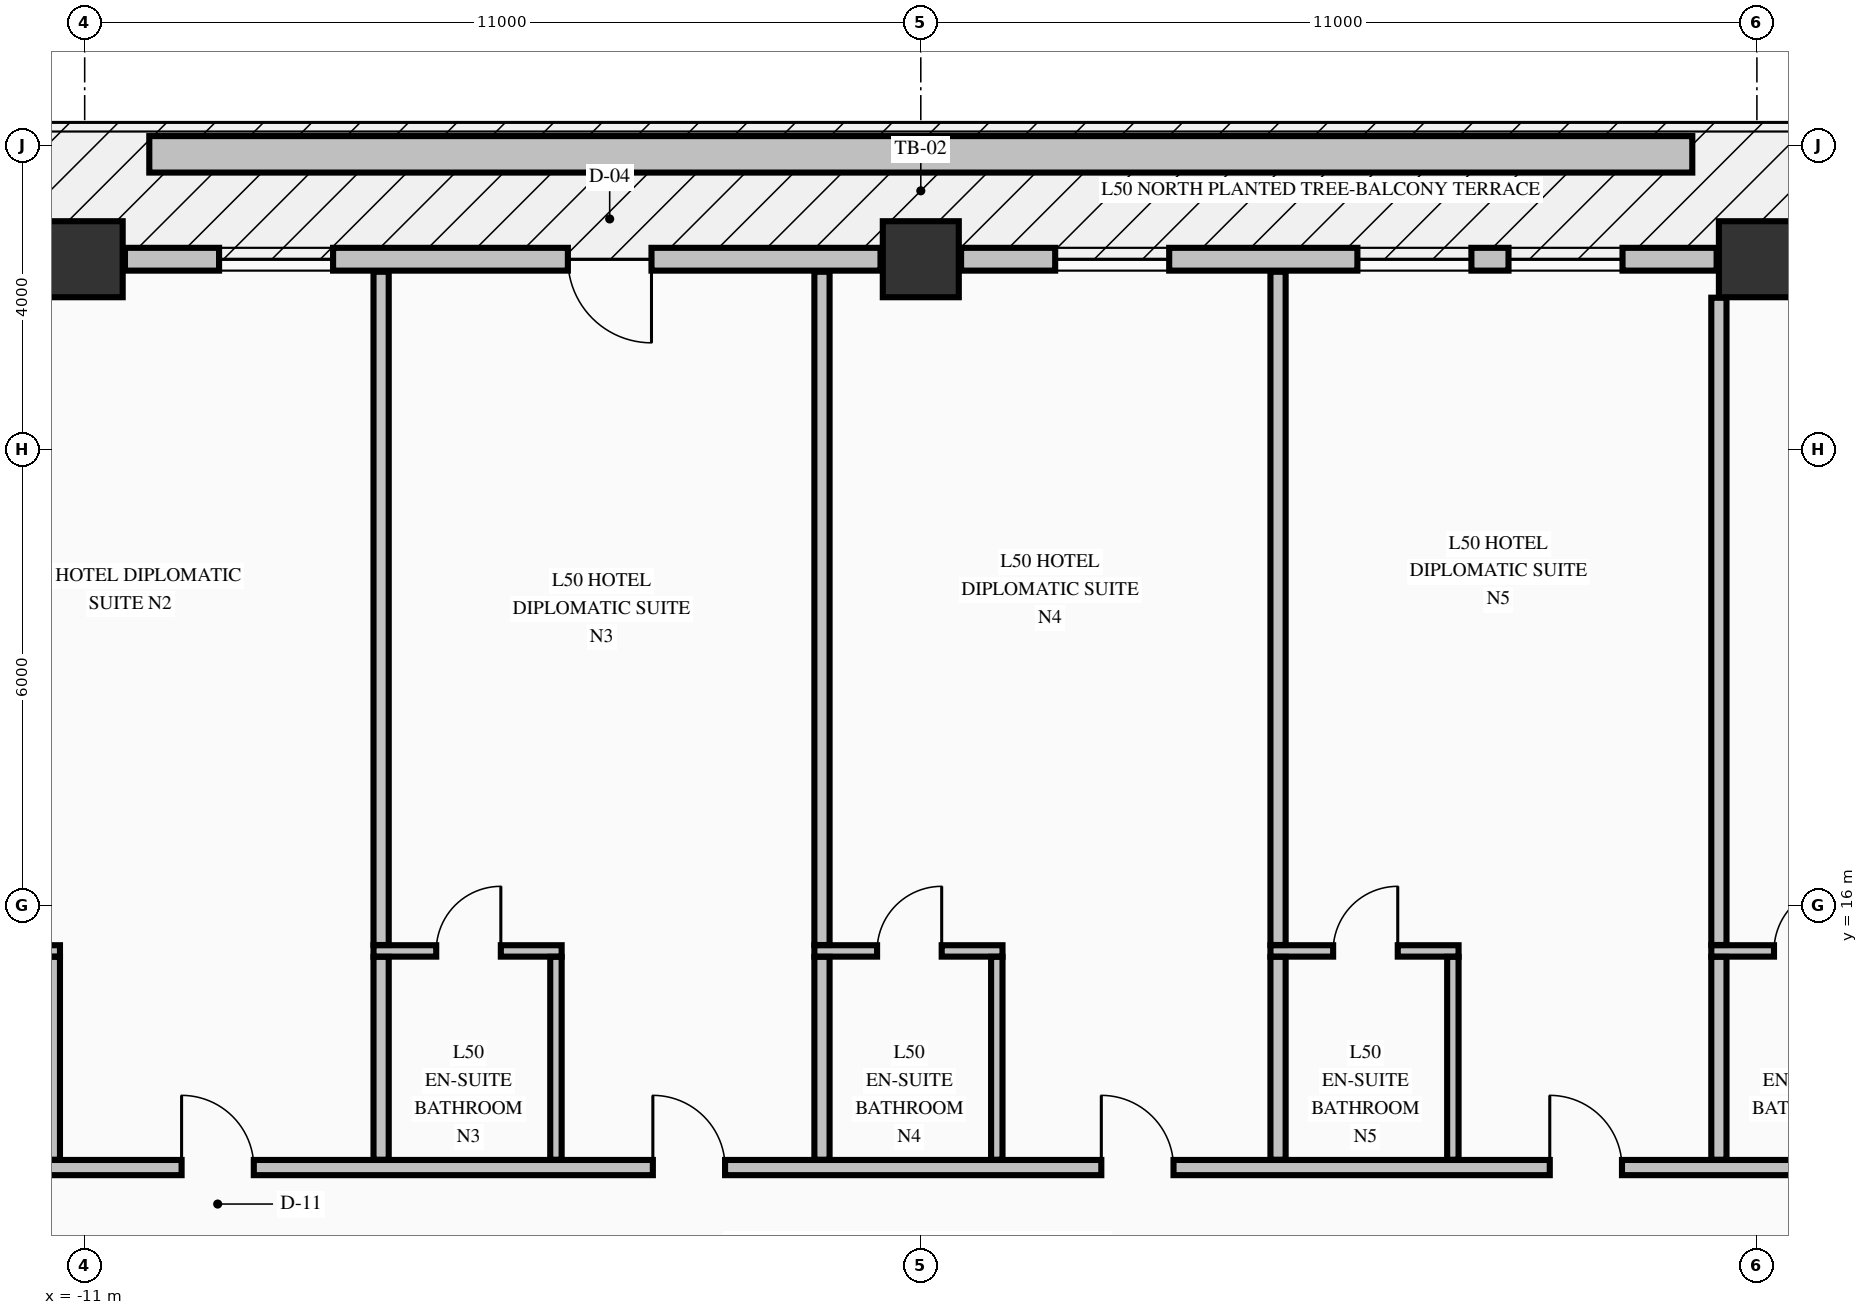
"""IFC4 building model, lengths in metres.
Left out: names, types, materials, properties, quantities, classifications, styles, units other than length and angle.
Written with IfcOpenShell. Run it as: python <this file> out.ifc"""

import sys

from ifc_helpers import new_model, si_unit, direction, frame, frame_2d, origin, origin_2d, place, context, subcontext, project, spatial, rectangle, extrude, element, fill, save


model = new_model("IFC4")
c1 = context("Model", 3, precision=1e-05, world=origin(), true_north=direction((0.0, 1.0)))
c2 = subcontext(c1, "Body", "Model", "MODEL_VIEW")
j1 = project(units=[si_unit("LENGTHUNIT", "METRE"), si_unit("PLANEANGLEUNIT", "RADIAN")], contexts=[c1])
p1 = place(None, origin())
s1 = spatial("IfcSite", under=j1, at=p1, CompositionType="ELEMENT")
p2 = place(p1, origin())
s2 = spatial("IfcBuilding", under=s1, at=p2, CompositionType="ELEMENT")
p3 = place(p2, frame((0.0, 0.0, 194.86)))
s3 = spatial("IfcBuildingStorey", under=s2, at=p3, CompositionType="ELEMENT", Elevation=194.86)
for number, where, z_axis, x_axis in (
    (1, (-11.0, 24.5, -0.275), (0.0, 0.0, 1.0), (1.0, 0.0, 0.0)),
    (2, (0.0, 24.5, -0.275), (0.0, 0.0, 1.0), (1.0, 0.0, 0.0)),
    (3, (11.0, 24.5, -0.275), (0.0, 0.0, 1.0), (1.0, 0.0, 0.0)),
):
    element("IfcColumn", number, at=place(p3, frame(where, z_axis=z_axis, x_axis=x_axis)), inside=s3, PredefinedType="COLUMN", context=c2, shape_type="SweptSolid", body=[
        extrude(rectangle(XDim=1.0, YDim=1.0, at=origin_2d()), origin(), (0.0, 0.0, 1.0), 3.425),
    ])
p4 = place(p3, frame((-0.53, 24.5, 0.0), z_axis=(0.0, 0.0, 1.0), x_axis=(-1.0, 0.0, 0.0)))
e4 = element("IfcWall", 4, at=p4, inside=s3, PredefinedType="STANDARD", context=c2, shape_type="SweptSolid", body=[
    extrude(rectangle(XDim=9.94, YDim=0.3, at=frame_2d((4.97, 0.0))), origin(), (0.0, 0.0, 1.0), 2.542),
])
p5 = place(p4, frame((3.013, 0.0, 0.0)))
e5 = element("IfcOpeningElement", 5, at=p5, cuts=e4, PredefinedType="OPENING", context=c2, shape_type="SweptSolid", body=[
    extrude(rectangle(XDim=1.1, YDim=2.15, at=frame_2d((0.55, 1.075))), frame((0.0, 0.16, 0.0), z_axis=(0.0, -1.0, 0.0), x_axis=(1.0, 0.0, 0.0)), (0.0, 0.0, 1.0), 0.32),
])
p6 = place(p4, frame((7.202, 0.0, 0.72)))
e6 = element("IfcOpeningElement", 6, at=p6, cuts=e4, PredefinedType="OPENING", context=c2, shape_type="SweptSolid", body=[
    extrude(rectangle(XDim=1.5, YDim=1.6, at=frame_2d((0.75, 0.8))), frame((0.0, 0.16, 0.0), z_axis=(0.0, -1.0, 0.0), x_axis=(1.0, 0.0, 0.0)), (0.0, 0.0, 1.0), 0.32),
])
p7 = place(p3, frame((10.47, 24.5, 0.0), z_axis=(0.0, 0.0, 1.0), x_axis=(-1.0, 0.0, 0.0)))
e7 = element("IfcWall", 7, at=p7, inside=s3, PredefinedType="STANDARD", context=c2, shape_type="SweptSolid", body=[
    extrude(rectangle(XDim=9.94, YDim=0.3, at=frame_2d((4.97, 0.0))), origin(), (0.0, 0.0, 1.0), 2.542),
])
p8 = place(p7, frame((1.238, 0.0, 0.72)))
e8 = element("IfcOpeningElement", 8, at=p8, cuts=e7, PredefinedType="OPENING", context=c2, shape_type="SweptSolid", body=[
    extrude(rectangle(XDim=1.5, YDim=1.6, at=frame_2d((0.75, 0.8))), frame((0.0, 0.16, 0.0), z_axis=(0.0, -1.0, 0.0), x_axis=(1.0, 0.0, 0.0)), (0.0, 0.0, 1.0), 0.32),
])
p9 = place(p7, frame((3.226, 0.0, 0.72)))
e9 = element("IfcOpeningElement", 9, at=p9, cuts=e7, PredefinedType="OPENING", context=c2, shape_type="SweptSolid", body=[
    extrude(rectangle(XDim=1.5, YDim=1.6, at=frame_2d((0.75, 0.8))), frame((0.0, 0.16, 0.0), z_axis=(0.0, -1.0, 0.0), x_axis=(1.0, 0.0, 0.0)), (0.0, 0.0, 1.0), 0.32),
])
p10 = place(p7, frame((7.202, 0.0, 0.72)))
e10 = element("IfcOpeningElement", 10, at=p10, cuts=e7, PredefinedType="OPENING", context=c2, shape_type="SweptSolid", body=[
    extrude(rectangle(XDim=1.5, YDim=1.6, at=frame_2d((0.75, 0.8))), frame((0.0, 0.16, 0.0), z_axis=(0.0, -1.0, 0.0), x_axis=(1.0, 0.0, 0.0)), (0.0, 0.0, 1.0), 0.32),
])
p11 = place(p3, frame((-22.1, 12.55, 0.0), z_axis=(0.0, 0.0, 1.0), x_axis=(1.0, 0.0, 0.0)))
e11 = element("IfcWall", 11, at=p11, inside=s3, PredefinedType="PARTITIONING", context=c2, shape_type="SweptSolid", body=[
    extrude(rectangle(XDim=39.2, YDim=0.2, at=frame_2d((19.6, 0.0))), origin(), (0.0, 0.0, 1.0), 3.15),
])
p12 = place(p11, frame((4.925, 0.0, 0.0)))
e12 = element("IfcOpeningElement", 12, at=p12, cuts=e11, PredefinedType="OPENING", context=c2, shape_type="SweptSolid", body=[
    extrude(rectangle(XDim=0.95, YDim=2.15, at=frame_2d((0.475, 1.075))), frame((0.0, 0.11, 0.0), z_axis=(0.0, -1.0, 0.0), x_axis=(1.0, 0.0, 0.0)), (0.0, 0.0, 1.0), 0.22),
])
p13 = place(p11, frame((12.375, 0.0, 0.0)))
e13 = element("IfcOpeningElement", 13, at=p13, cuts=e11, PredefinedType="OPENING", context=c2, shape_type="SweptSolid", body=[
    extrude(rectangle(XDim=0.95, YDim=2.15, at=frame_2d((0.475, 1.075))), frame((0.0, 0.11, 0.0), z_axis=(0.0, -1.0, 0.0), x_axis=(1.0, 0.0, 0.0)), (0.0, 0.0, 1.0), 0.22),
])
p14 = place(p11, frame((18.575, 0.0, 0.0)))
e14 = element("IfcOpeningElement", 14, at=p14, cuts=e11, PredefinedType="OPENING", context=c2, shape_type="SweptSolid", body=[
    extrude(rectangle(XDim=0.95, YDim=2.15, at=frame_2d((0.475, 1.075))), frame((0.0, 0.11, 0.0), z_axis=(0.0, -1.0, 0.0), x_axis=(1.0, 0.0, 0.0)), (0.0, 0.0, 1.0), 0.22),
])
p15 = place(p11, frame((24.475, 0.0, 0.0)))
e15 = element("IfcOpeningElement", 15, at=p15, cuts=e11, PredefinedType="OPENING", context=c2, shape_type="SweptSolid", body=[
    extrude(rectangle(XDim=0.95, YDim=2.15, at=frame_2d((0.475, 1.075))), frame((0.0, 0.11, 0.0), z_axis=(0.0, -1.0, 0.0), x_axis=(1.0, 0.0, 0.0)), (0.0, 0.0, 1.0), 0.22),
])
p16 = place(p11, frame((30.375, 0.0, 0.0)))
e16 = element("IfcOpeningElement", 16, at=p16, cuts=e11, PredefinedType="OPENING", context=c2, shape_type="SweptSolid", body=[
    extrude(rectangle(XDim=0.95, YDim=2.15, at=frame_2d((0.475, 1.075))), frame((0.0, 0.11, 0.0), z_axis=(0.0, -1.0, 0.0), x_axis=(1.0, 0.0, 0.0)), (0.0, 0.0, 1.0), 0.22),
])
p17 = place(p11, frame((36.525, 0.0, 0.0)))
e17 = element("IfcOpeningElement", 17, at=p17, cuts=e11, PredefinedType="OPENING", context=c2, shape_type="SweptSolid", body=[
    extrude(rectangle(XDim=0.95, YDim=2.15, at=frame_2d((0.475, 1.075))), frame((0.0, 0.11, 0.0), z_axis=(0.0, -1.0, 0.0), x_axis=(1.0, 0.0, 0.0)), (0.0, 0.0, 1.0), 0.22),
])
p18 = place(p3, frame((-13.8, 15.4, 0.0), z_axis=(0.0, 0.0, 1.0), x_axis=(1.0, 0.0, 0.0)))
e18 = element("IfcWall", 18, at=p18, inside=s3, PredefinedType="PARTITIONING", context=c2, shape_type="SweptSolid", body=[
    extrude(rectangle(XDim=2.475, YDim=0.15, at=frame_2d((1.238, 0.0))), origin(), (0.0, 0.0, 1.0), 3.15),
])
p19 = place(p18, frame((0.825, 0.0, 0.0)))
e19 = element("IfcOpeningElement", 19, at=p19, cuts=e18, PredefinedType="OPENING", context=c2, shape_type="SweptSolid", body=[
    extrude(rectangle(XDim=0.85, YDim=2.1, at=frame_2d((0.425, 1.05))), frame((0.0, 0.085, 0.0), z_axis=(0.0, -1.0, 0.0), x_axis=(1.0, 0.0, 0.0)), (0.0, 0.0, 1.0), 0.17),
])
p20 = place(p3, frame((-7.2, 15.4, 0.0), z_axis=(0.0, 0.0, 1.0), x_axis=(1.0, 0.0, 0.0)))
e20 = element("IfcWall", 20, at=p20, inside=s3, PredefinedType="PARTITIONING", context=c2, shape_type="SweptSolid", body=[
    extrude(rectangle(XDim=2.475, YDim=0.15, at=frame_2d((1.237, 0.0))), origin(), (0.0, 0.0, 1.0), 3.15),
])
p21 = place(p20, frame((0.825, 0.0, 0.0)))
e21 = element("IfcOpeningElement", 21, at=p21, cuts=e20, PredefinedType="OPENING", context=c2, shape_type="SweptSolid", body=[
    extrude(rectangle(XDim=0.85, YDim=2.1, at=frame_2d((0.425, 1.05))), frame((0.0, 0.085, 0.0), z_axis=(0.0, -1.0, 0.0), x_axis=(1.0, 0.0, 0.0)), (0.0, 0.0, 1.0), 0.17),
])
p22 = place(p3, frame((-1.4, 15.4, 0.0), z_axis=(0.0, 0.0, 1.0), x_axis=(1.0, 0.0, 0.0)))
e22 = element("IfcWall", 22, at=p22, inside=s3, PredefinedType="PARTITIONING", context=c2, shape_type="SweptSolid", body=[
    extrude(rectangle(XDim=2.475, YDim=0.15, at=frame_2d((1.237, 0.0))), origin(), (0.0, 0.0, 1.0), 3.15),
])
p23 = place(p22, frame((0.825, 0.0, 0.0)))
e23 = element("IfcOpeningElement", 23, at=p23, cuts=e22, PredefinedType="OPENING", context=c2, shape_type="SweptSolid", body=[
    extrude(rectangle(XDim=0.85, YDim=2.1, at=frame_2d((0.425, 1.05))), frame((0.0, 0.085, 0.0), z_axis=(0.0, -1.0, 0.0), x_axis=(1.0, 0.0, 0.0)), (0.0, 0.0, 1.0), 0.17),
])
p24 = place(p3, frame((4.6, 15.4, 0.0), z_axis=(0.0, 0.0, 1.0), x_axis=(1.0, 0.0, 0.0)))
e24 = element("IfcWall", 24, at=p24, inside=s3, PredefinedType="PARTITIONING", context=c2, shape_type="SweptSolid", body=[
    extrude(rectangle(XDim=2.475, YDim=0.15, at=frame_2d((1.237, 0.0))), origin(), (0.0, 0.0, 1.0), 3.15),
])
p25 = place(p24, frame((0.825, 0.0, 0.0)))
e25 = element("IfcOpeningElement", 25, at=p25, cuts=e24, PredefinedType="OPENING", context=c2, shape_type="SweptSolid", body=[
    extrude(rectangle(XDim=0.85, YDim=2.1, at=frame_2d((0.425, 1.05))), frame((0.0, 0.085, 0.0), z_axis=(0.0, -1.0, 0.0), x_axis=(1.0, 0.0, 0.0)), (0.0, 0.0, 1.0), 0.17),
])
p26 = place(p3, frame((10.4, 15.4, 0.0), z_axis=(0.0, 0.0, 1.0), x_axis=(1.0, 0.0, 0.0)))
e26 = element("IfcWall", 26, at=p26, inside=s3, PredefinedType="PARTITIONING", context=c2, shape_type="SweptSolid", body=[
    extrude(rectangle(XDim=2.475, YDim=0.15, at=frame_2d((1.238, 0.0))), origin(), (0.0, 0.0, 1.0), 3.15),
])
p27 = place(p26, frame((0.825, 0.0, 0.0)))
e27 = element("IfcOpeningElement", 27, at=p27, cuts=e26, PredefinedType="OPENING", context=c2, shape_type="SweptSolid", body=[
    extrude(rectangle(XDim=0.85, YDim=2.1, at=frame_2d((0.425, 1.05))), frame((0.0, 0.085, 0.0), z_axis=(0.0, -1.0, 0.0), x_axis=(1.0, 0.0, 0.0)), (0.0, 0.0, 1.0), 0.17),
])
p28 = place(p3, frame((-11.4, 12.653, 0.0), z_axis=(0.0, 0.0, 1.0), x_axis=(0.0, 1.0, 0.0)))
e28 = element("IfcWall", 28, at=p28, inside=s3, PredefinedType="PARTITIONING", context=c2, shape_type="SweptSolid", body=[
    extrude(rectangle(XDim=2.669, YDim=0.15, at=frame_2d((1.334, 0.0))), origin(), (0.0, 0.0, 1.0), 2.342),
])
p29 = place(p3, frame((-7.1, 12.653, 0.0), z_axis=(0.0, 0.0, 1.0), x_axis=(0.0, 1.0, 0.0)))
e29 = element("IfcWall", 29, at=p29, inside=s3, PredefinedType="PARTITIONING", context=c2, shape_type="SweptSolid", body=[
    extrude(rectangle(XDim=2.669, YDim=0.2, at=frame_2d((1.334, 0.0))), origin(), (0.0, 0.0, 1.0), 3.15),
])
p30 = place(p3, frame((-7.1, 15.478, 0.0), z_axis=(0.0, 0.0, 1.0), x_axis=(0.0, 1.0, 0.0)))
e30 = element("IfcWall", 30, at=p30, inside=s3, PredefinedType="PARTITIONING", context=c2, shape_type="SweptSolid", body=[
    extrude(rectangle(XDim=8.857, YDim=0.2, at=frame_2d((4.428, 0.0))), origin(), (0.0, 0.0, 1.0), 3.15),
])
p31 = place(p3, frame((-4.8, 12.653, 0.0), z_axis=(0.0, 0.0, 1.0), x_axis=(0.0, 1.0, 0.0)))
e31 = element("IfcWall", 31, at=p31, inside=s3, PredefinedType="PARTITIONING", context=c2, shape_type="SweptSolid", body=[
    extrude(rectangle(XDim=2.669, YDim=0.15, at=frame_2d((1.334, 0.0))), origin(), (0.0, 0.0, 1.0), 3.15),
])
p32 = place(p3, frame((-1.3, 12.653, 0.0), z_axis=(0.0, 0.0, 1.0), x_axis=(0.0, 1.0, 0.0)))
e32 = element("IfcWall", 32, at=p32, inside=s3, PredefinedType="PARTITIONING", context=c2, shape_type="SweptSolid", body=[
    extrude(rectangle(XDim=2.669, YDim=0.2, at=frame_2d((1.334, 0.0))), origin(), (0.0, 0.0, 1.0), 3.15),
])
p33 = place(p3, frame((-1.3, 15.478, 0.0), z_axis=(0.0, 0.0, 1.0), x_axis=(0.0, 1.0, 0.0)))
e33 = element("IfcWall", 33, at=p33, inside=s3, PredefinedType="PARTITIONING", context=c2, shape_type="SweptSolid", body=[
    extrude(rectangle(XDim=8.857, YDim=0.2, at=frame_2d((4.428, 0.0))), origin(), (0.0, 0.0, 1.0), 3.15),
])
p34 = place(p3, frame((1.0, 12.653, 0.0), z_axis=(0.0, 0.0, 1.0), x_axis=(0.0, 1.0, 0.0)))
e34 = element("IfcWall", 34, at=p34, inside=s3, PredefinedType="PARTITIONING", context=c2, shape_type="SweptSolid", body=[
    extrude(rectangle(XDim=2.669, YDim=0.15, at=frame_2d((1.334, 0.0))), origin(), (0.0, 0.0, 1.0), 3.15),
])
p35 = place(p3, frame((4.7, 12.653, 0.0), z_axis=(0.0, 0.0, 1.0), x_axis=(0.0, 1.0, 0.0)))
e35 = element("IfcWall", 35, at=p35, inside=s3, PredefinedType="PARTITIONING", context=c2, shape_type="SweptSolid", body=[
    extrude(rectangle(XDim=2.669, YDim=0.2, at=frame_2d((1.334, 0.0))), origin(), (0.0, 0.0, 1.0), 3.15),
])
p36 = place(p3, frame((4.7, 15.478, 0.0), z_axis=(0.0, 0.0, 1.0), x_axis=(0.0, 1.0, 0.0)))
e36 = element("IfcWall", 36, at=p36, inside=s3, PredefinedType="PARTITIONING", context=c2, shape_type="SweptSolid", body=[
    extrude(rectangle(XDim=8.857, YDim=0.2, at=frame_2d((4.428, 0.0))), origin(), (0.0, 0.0, 1.0), 3.15),
])
p37 = place(p3, frame((7.0, 12.653, 0.0), z_axis=(0.0, 0.0, 1.0), x_axis=(0.0, 1.0, 0.0)))
e37 = element("IfcWall", 37, at=p37, inside=s3, PredefinedType="PARTITIONING", context=c2, shape_type="SweptSolid", body=[
    extrude(rectangle(XDim=2.669, YDim=0.15, at=frame_2d((1.334, 0.0))), origin(), (0.0, 0.0, 1.0), 3.15),
])
p38 = place(p3, frame((10.5, 12.653, 0.0), z_axis=(0.0, 0.0, 1.0), x_axis=(0.0, 1.0, 0.0)))
e38 = element("IfcWall", 38, at=p38, inside=s3, PredefinedType="PARTITIONING", context=c2, shape_type="SweptSolid", body=[
    extrude(rectangle(XDim=2.669, YDim=0.2, at=frame_2d((1.334, 0.0))), origin(), (0.0, 0.0, 1.0), 3.15),
])
p39 = place(p3, frame((10.5, 15.478, 0.0), z_axis=(0.0, 0.0, 1.0), x_axis=(0.0, 1.0, 0.0)))
e39 = element("IfcWall", 39, at=p39, inside=s3, PredefinedType="PARTITIONING", context=c2, shape_type="SweptSolid", body=[
    extrude(rectangle(XDim=8.516, YDim=0.2, at=frame_2d((4.258, 0.0))), origin(), (0.0, 0.0, 1.0), 3.15),
])
p40 = place(p3, frame((-10.15, 25.88, -0.04), z_axis=(0.0, 0.0, 1.0), x_axis=(1.0, 0.0, 0.0)))
e40 = element("IfcWall", 40, at=p40, inside=s3, PredefinedType="PARAPET", context=c2, shape_type="SweptSolid", body=[
    extrude(rectangle(XDim=20.3, YDim=0.48, at=frame_2d((10.15, 0.0))), origin(), (0.0, 0.0, 1.0), 0.52),
])
p41 = place(p5, origin())
e41 = element("IfcDoor", 41, at=p41, inside=s3, OperationType="SINGLE_SWING_LEFT", PredefinedType="DOOR", context=c2, shape_type="SweptSolid", body=[
    extrude(rectangle(XDim=1.1, YDim=2.15, at=frame_2d((0.55, 1.075))), frame((0.0, 0.025, 0.0), z_axis=(0.0, -1.0, 0.0), x_axis=(1.0, 0.0, 0.0)), (0.0, 0.0, 1.0), 0.05),
])
fill(e5, e41)
p42 = place(p6, origin())
e42 = element("IfcWindow", 42, at=p42, inside=s3, PartitioningType="SINGLE_PANEL", PredefinedType="WINDOW", context=c2, shape_type="SweptSolid", body=[
    extrude(rectangle(XDim=1.5, YDim=1.6, at=frame_2d((0.75, 0.8))), frame((0.0, 0.03, 0.0), z_axis=(0.0, -1.0, 0.0), x_axis=(1.0, 0.0, 0.0)), (0.0, 0.0, 1.0), 0.06),
])
fill(e6, e42)
p43 = place(p8, origin())
e43 = element("IfcWindow", 43, at=p43, inside=s3, PartitioningType="SINGLE_PANEL", PredefinedType="WINDOW", context=c2, shape_type="SweptSolid", body=[
    extrude(rectangle(XDim=1.5, YDim=1.6, at=frame_2d((0.75, 0.8))), frame((0.0, 0.03, 0.0), z_axis=(0.0, -1.0, 0.0), x_axis=(1.0, 0.0, 0.0)), (0.0, 0.0, 1.0), 0.06),
])
fill(e8, e43)
p44 = place(p9, origin())
e44 = element("IfcWindow", 44, at=p44, inside=s3, PartitioningType="SINGLE_PANEL", PredefinedType="WINDOW", context=c2, shape_type="SweptSolid", body=[
    extrude(rectangle(XDim=1.5, YDim=1.6, at=frame_2d((0.75, 0.8))), frame((0.0, 0.03, 0.0), z_axis=(0.0, -1.0, 0.0), x_axis=(1.0, 0.0, 0.0)), (0.0, 0.0, 1.0), 0.06),
])
fill(e9, e44)
p45 = place(p10, origin())
e45 = element("IfcWindow", 45, at=p45, inside=s3, PartitioningType="SINGLE_PANEL", PredefinedType="WINDOW", context=c2, shape_type="SweptSolid", body=[
    extrude(rectangle(XDim=1.5, YDim=1.6, at=frame_2d((0.75, 0.8))), frame((0.0, 0.03, 0.0), z_axis=(0.0, -1.0, 0.0), x_axis=(1.0, 0.0, 0.0)), (0.0, 0.0, 1.0), 0.06),
])
fill(e10, e45)
p46 = place(p13, origin())
e46 = element("IfcDoor", 46, at=p46, inside=s3, OperationType="SINGLE_SWING_LEFT", PredefinedType="DOOR", context=c2, shape_type="SweptSolid", body=[
    extrude(rectangle(XDim=0.95, YDim=2.15, at=frame_2d((0.475, 1.075))), frame((0.0, 0.025, 0.0), z_axis=(0.0, -1.0, 0.0), x_axis=(1.0, 0.0, 0.0)), (0.0, 0.0, 1.0), 0.05),
])
fill(e13, e46)
p47 = place(p14, origin())
e47 = element("IfcDoor", 47, at=p47, inside=s3, OperationType="SINGLE_SWING_LEFT", PredefinedType="DOOR", context=c2, shape_type="SweptSolid", body=[
    extrude(rectangle(XDim=0.95, YDim=2.15, at=frame_2d((0.475, 1.075))), frame((0.0, 0.025, 0.0), z_axis=(0.0, -1.0, 0.0), x_axis=(1.0, 0.0, 0.0)), (0.0, 0.0, 1.0), 0.05),
])
fill(e14, e47)
p48 = place(p21, origin())
e48 = element("IfcDoor", 48, at=p48, inside=s3, OperationType="SINGLE_SWING_RIGHT", PredefinedType="DOOR", context=c2, shape_type="SweptSolid", body=[
    extrude(rectangle(XDim=0.85, YDim=2.1, at=frame_2d((0.425, 1.05))), frame((0.0, 0.025, 0.0), z_axis=(0.0, -1.0, 0.0), x_axis=(1.0, 0.0, 0.0)), (0.0, 0.0, 1.0), 0.05),
])
fill(e21, e48)
p49 = place(p15, origin())
e49 = element("IfcDoor", 49, at=p49, inside=s3, OperationType="SINGLE_SWING_LEFT", PredefinedType="DOOR", context=c2, shape_type="SweptSolid", body=[
    extrude(rectangle(XDim=0.95, YDim=2.15, at=frame_2d((0.475, 1.075))), frame((0.0, 0.025, 0.0), z_axis=(0.0, -1.0, 0.0), x_axis=(1.0, 0.0, 0.0)), (0.0, 0.0, 1.0), 0.05),
])
fill(e15, e49)
p50 = place(p23, origin())
e50 = element("IfcDoor", 50, at=p50, inside=s3, OperationType="SINGLE_SWING_RIGHT", PredefinedType="DOOR", context=c2, shape_type="SweptSolid", body=[
    extrude(rectangle(XDim=0.85, YDim=2.1, at=frame_2d((0.425, 1.05))), frame((0.0, 0.025, 0.0), z_axis=(0.0, -1.0, 0.0), x_axis=(1.0, 0.0, 0.0)), (0.0, 0.0, 1.0), 0.05),
])
fill(e23, e50)
p51 = place(p16, origin())
e51 = element("IfcDoor", 51, at=p51, inside=s3, OperationType="SINGLE_SWING_LEFT", PredefinedType="DOOR", context=c2, shape_type="SweptSolid", body=[
    extrude(rectangle(XDim=0.95, YDim=2.15, at=frame_2d((0.475, 1.075))), frame((0.0, 0.025, 0.0), z_axis=(0.0, -1.0, 0.0), x_axis=(1.0, 0.0, 0.0)), (0.0, 0.0, 1.0), 0.05),
])
fill(e16, e51)
p52 = place(p25, origin())
e52 = element("IfcDoor", 52, at=p52, inside=s3, OperationType="SINGLE_SWING_RIGHT", PredefinedType="DOOR", context=c2, shape_type="SweptSolid", body=[
    extrude(rectangle(XDim=0.85, YDim=2.1, at=frame_2d((0.425, 1.05))), frame((0.0, 0.025, 0.0), z_axis=(0.0, -1.0, 0.0), x_axis=(1.0, 0.0, 0.0)), (0.0, 0.0, 1.0), 0.05),
])
fill(e25, e52)
p53 = place(p27, origin())
e53 = element("IfcDoor", 53, at=p53, inside=s3, OperationType="SINGLE_SWING_RIGHT", PredefinedType="DOOR", context=c2, shape_type="SweptSolid", body=[
    extrude(rectangle(XDim=0.85, YDim=2.1, at=frame_2d((0.425, 1.05))), frame((0.0, 0.025, 0.0), z_axis=(0.0, -1.0, 0.0), x_axis=(1.0, 0.0, 0.0)), (0.0, 0.0, 1.0), 0.05),
])
fill(e27, e53)
save(model, sys.argv[1])
